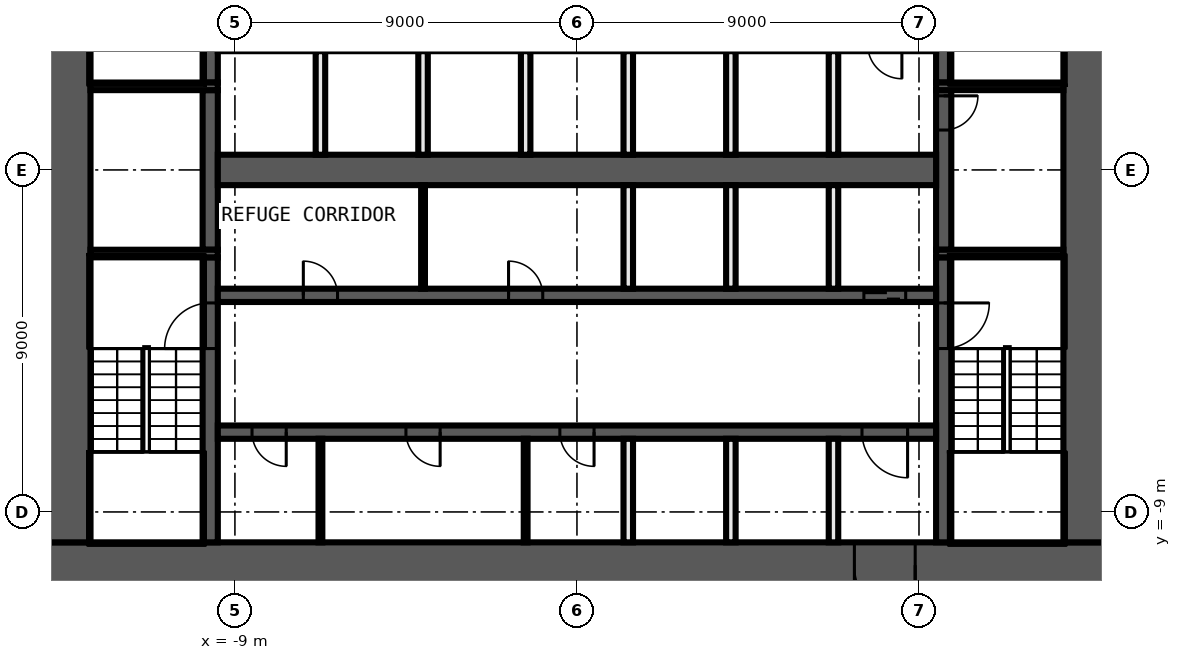
"""IFC4 building model, lengths in metres.
Left out: names, types, materials, properties, quantities, classifications, styles, units other than length and angle.
Written with IfcOpenShell. Run it as: python <this file> out.ifc"""

import sys

from ifc_helpers import new_model, si_unit, direction, frame, frame_2d, origin, place, context, subcontext, project, spatial, rectangle, extrude, element, fill, save


model = new_model("IFC4")
c1 = context("Model", 3, precision=1e-05, world=origin(), true_north=direction((0.0, 1.0)))
c2 = subcontext(c1, "Body", "Model", "MODEL_VIEW")
j1 = project(units=[si_unit("LENGTHUNIT", "METRE"), si_unit("PLANEANGLEUNIT", "RADIAN")], contexts=[c1])
p1 = place(None, origin())
s1 = spatial("IfcSite", under=j1, at=p1, CompositionType="ELEMENT")
p2 = place(p1, origin())
s2 = spatial("IfcBuilding", under=s1, at=p2, CompositionType="ELEMENT")
p3 = place(p2, frame((0.0, 0.0, 89.2)))
s3 = spatial("IfcBuildingStorey", under=s2, at=p3, CompositionType="ELEMENT", Elevation=89.2)
p4 = place(p3, frame((14.0, -10.4, 0.0), z_axis=(0.0, 0.0, 1.0), x_axis=(-1.0, 0.0, 0.0)))
e1 = element("IfcWall", 1, at=p4, inside=s3, PredefinedType="SHEAR", context=c2, shape_type="SweptSolid", body=[
    extrude(rectangle(XDim=28.0, YDim=1.2, at=frame_2d((14.0, 0.0))), origin(), (0.0, 0.0, 1.0), 5.55),
])
p5 = place(p4, frame((5.1, 0.0, 0.0)))
e2 = element("IfcOpeningElement", 2, at=p5, cuts=e1, PredefinedType="OPENING", context=c2, shape_type="SweptSolid", body=[
    extrude(rectangle(XDim=1.6, YDim=2.1, at=frame_2d((0.8, 1.05))), frame((0.0, 0.61, 0.0), z_axis=(0.0, -1.0, 0.0), x_axis=(1.0, 0.0, 0.0)), (0.0, 0.0, 1.0), 1.22),
])
for number, where, z_axis, x_axis in (
    (3, (13.4, 9.8, 0.0), (0.0, 0.0, 1.0), (0.0, -1.0, 0.0)),
    (4, (-13.4, -9.8, 0.0), (0.0, 0.0, 1.0), (0.0, 1.0, 0.0)),
):
    element("IfcWall", number, at=place(p3, frame(where, z_axis=z_axis, x_axis=x_axis)), inside=s3, PredefinedType="SHEAR", context=c2, shape_type="SweptSolid", body=[
        extrude(rectangle(XDim=19.6, YDim=1.2, at=frame_2d((9.8, 0.0))), origin(), (0.0, 0.0, 1.0), 5.55),
    ])
p6 = place(p3, frame((9.65, -2.3, 0.0), z_axis=(0.0, 0.0, 1.0), x_axis=(0.0, -1.0, 0.0)))
e5 = element("IfcWall", 5, at=p6, inside=s3, PredefinedType="SHEAR", context=c2, shape_type="SweptSolid", body=[
    extrude(rectangle(XDim=7.5, YDim=0.4, at=frame_2d((3.75, 0.0))), origin(), (0.0, 0.0, 1.0), 5.55),
])
p7 = place(p6, frame((1.2, 0.0, 0.0)))
e6 = element("IfcOpeningElement", 6, at=p7, cuts=e5, PredefinedType="OPENING", context=c2, shape_type="SweptSolid", body=[
    extrude(rectangle(XDim=1.2, YDim=2.1, at=frame_2d((0.6, 1.05))), frame((0.0, 0.21, 0.0), z_axis=(0.0, -1.0, 0.0), x_axis=(1.0, 0.0, 0.0)), (0.0, 0.0, 1.0), 0.42),
])
p8 = place(p3, frame((9.65, 2.1, 0.0), z_axis=(0.0, 0.0, 1.0), x_axis=(0.0, -1.0, 0.0)))
e7 = element("IfcWall", 7, at=p8, inside=s3, PredefinedType="SHEAR", context=c2, shape_type="SweptSolid", body=[
    extrude(rectangle(XDim=4.2, YDim=0.4, at=frame_2d((2.1, 0.0))), origin(), (0.0, 0.0, 1.0), 5.55),
])
p9 = place(p8, frame((0.15, 0.0, 0.0)))
e8 = element("IfcOpeningElement", 8, at=p9, cuts=e7, PredefinedType="OPENING", context=c2, shape_type="SweptSolid", body=[
    extrude(rectangle(XDim=0.9, YDim=2.1, at=frame_2d((0.45, 1.05))), frame((0.0, 0.21, 0.0), z_axis=(0.0, -1.0, 0.0), x_axis=(1.0, 0.0, 0.0)), (0.0, 0.0, 1.0), 0.42),
])
p10 = place(p3, frame((9.65, 9.8, 0.0), z_axis=(0.0, 0.0, 1.0), x_axis=(0.0, -1.0, 0.0)))
e9 = element("IfcWall", 9, at=p10, inside=s3, PredefinedType="SHEAR", context=c2, shape_type="SweptSolid", body=[
    extrude(rectangle(XDim=7.5, YDim=0.4, at=frame_2d((3.75, 0.0))), origin(), (0.0, 0.0, 1.0), 5.55),
])
p11 = place(p10, frame((5.1, 0.0, 0.0)))
e10 = element("IfcOpeningElement", 10, at=p11, cuts=e9, PredefinedType="OPENING", context=c2, shape_type="SweptSolid", body=[
    extrude(rectangle(XDim=1.2, YDim=2.1, at=frame_2d((0.6, 1.05))), frame((0.0, 0.21, 0.0), z_axis=(0.0, -1.0, 0.0), x_axis=(1.0, 0.0, 0.0)), (0.0, 0.0, 1.0), 0.42),
])
p12 = place(p3, frame((-9.65, -9.8, 0.0), z_axis=(0.0, 0.0, 1.0), x_axis=(0.0, 1.0, 0.0)))
e11 = element("IfcWall", 11, at=p12, inside=s3, PredefinedType="SHEAR", context=c2, shape_type="SweptSolid", body=[
    extrude(rectangle(XDim=7.5, YDim=0.4, at=frame_2d((3.75, 0.0))), origin(), (0.0, 0.0, 1.0), 5.55),
])
p13 = place(p12, frame((5.1, 0.0, 0.0)))
e12 = element("IfcOpeningElement", 12, at=p13, cuts=e11, PredefinedType="OPENING", context=c2, shape_type="SweptSolid", body=[
    extrude(rectangle(XDim=1.2, YDim=2.1, at=frame_2d((0.6, 1.05))), frame((0.0, 0.21, 0.0), z_axis=(0.0, -1.0, 0.0), x_axis=(1.0, 0.0, 0.0)), (0.0, 0.0, 1.0), 0.42),
])
p14 = place(p3, frame((-9.65, -2.1, 0.0), z_axis=(0.0, 0.0, 1.0), x_axis=(0.0, 1.0, 0.0)))
e13 = element("IfcWall", 13, at=p14, inside=s3, PredefinedType="SHEAR", context=c2, shape_type="SweptSolid", body=[
    extrude(rectangle(XDim=4.2, YDim=0.4, at=frame_2d((2.1, 0.0))), origin(), (0.0, 0.0, 1.0), 5.55),
])
p15 = place(p3, frame((-9.65, 2.3, 0.0), z_axis=(0.0, 0.0, 1.0), x_axis=(0.0, 1.0, 0.0)))
e14 = element("IfcWall", 14, at=p15, inside=s3, PredefinedType="SHEAR", context=c2, shape_type="SweptSolid", body=[
    extrude(rectangle(XDim=7.5, YDim=0.4, at=frame_2d((3.75, 0.0))), origin(), (0.0, 0.0, 1.0), 5.55),
])
p16 = place(p15, frame((1.2, 0.0, 0.0)))
e15 = element("IfcOpeningElement", 15, at=p16, cuts=e14, PredefinedType="OPENING", context=c2, shape_type="SweptSolid", body=[
    extrude(rectangle(XDim=1.2, YDim=2.1, at=frame_2d((0.6, 1.05))), frame((0.0, 0.21, 0.0), z_axis=(0.0, -1.0, 0.0), x_axis=(1.0, 0.0, 0.0)), (0.0, 0.0, 1.0), 0.42),
])
for number, where, z_axis, x_axis in (
    (16, (9.45, 2.2, 0.0), (0.0, 0.0, 1.0), (1.0, 0.0, 0.0)),
    (17, (-9.45, 2.2, 0.0), (0.0, 0.0, 1.0), (-1.0, 0.0, 0.0)),
    (18, (9.45, -2.2, 0.0), (0.0, 0.0, 1.0), (1.0, 0.0, 0.0)),
    (19, (-9.45, -2.2, 0.0), (0.0, 0.0, 1.0), (-1.0, 0.0, 0.0)),
):
    element("IfcWall", number, at=place(p3, frame(where, z_axis=z_axis, x_axis=x_axis)), inside=s3, PredefinedType="SHEAR", context=c2, shape_type="SweptSolid", body=[
        extrude(rectangle(XDim=3.35, YDim=0.2, at=frame_2d((1.675, 0.0))), origin(), (0.0, 0.0, 1.0), 5.55),
    ])
p17 = place(p3, frame((-9.45, -3.3, 0.0), z_axis=(0.0, 0.0, 1.0), x_axis=(1.0, 0.0, 0.0)))
e20 = element("IfcWall", 20, at=p17, inside=s3, PredefinedType="SHEAR", context=c2, shape_type="SweptSolid", body=[
    extrude(rectangle(XDim=18.9, YDim=0.35, at=frame_2d((9.45, 0.0))), origin(), (0.0, 0.0, 1.0), 5.55),
])
p18 = place(p17, frame((17.0, 0.0, 0.0)))
e21 = element("IfcOpeningElement", 21, at=p18, cuts=e20, PredefinedType="OPENING", context=c2, shape_type="SweptSolid", body=[
    extrude(rectangle(XDim=1.1, YDim=2.1, at=frame_2d((0.55, 1.05))), frame((0.0, 0.185, 0.0), z_axis=(0.0, -1.0, 0.0), x_axis=(1.0, 0.0, 0.0)), (0.0, 0.0, 1.0), 0.37),
])
p19 = place(p17, frame((2.25, 0.0, 0.0)))
e22 = element("IfcOpeningElement", 22, at=p19, cuts=e20, PredefinedType="OPENING", context=c2, shape_type="SweptSolid", body=[
    extrude(rectangle(XDim=0.9, YDim=2.1, at=frame_2d((0.45, 1.05))), frame((0.0, 0.185, 0.0), z_axis=(0.0, -1.0, 0.0), x_axis=(1.0, 0.0, 0.0)), (0.0, 0.0, 1.0), 0.37),
])
p20 = place(p17, frame((7.65, 0.0, 0.0)))
e23 = element("IfcOpeningElement", 23, at=p20, cuts=e20, PredefinedType="OPENING", context=c2, shape_type="SweptSolid", body=[
    extrude(rectangle(XDim=0.9, YDim=2.1, at=frame_2d((0.45, 1.05))), frame((0.0, 0.185, 0.0), z_axis=(0.0, -1.0, 0.0), x_axis=(1.0, 0.0, 0.0)), (0.0, 0.0, 1.0), 0.37),
])
p21 = place(p3, frame((9.45, -6.9, 0.0), z_axis=(0.0, 0.0, 1.0), x_axis=(-1.0, 0.0, 0.0)))
e24 = element("IfcWall", 24, at=p21, inside=s3, PredefinedType="SHEAR", context=c2, shape_type="SweptSolid", body=[
    extrude(rectangle(XDim=18.9, YDim=0.35, at=frame_2d((9.45, 0.0))), origin(), (0.0, 0.0, 1.0), 5.55),
])
p22 = place(p21, frame((0.75, 0.0, 0.0)))
e25 = element("IfcOpeningElement", 25, at=p22, cuts=e24, PredefinedType="OPENING", context=c2, shape_type="SweptSolid", body=[
    extrude(rectangle(XDim=1.2, YDim=2.1, at=frame_2d((0.6, 1.05))), frame((0.0, 0.185, 0.0), z_axis=(0.0, -1.0, 0.0), x_axis=(1.0, 0.0, 0.0)), (0.0, 0.0, 1.0), 0.37),
])
p23 = place(p21, frame((17.1, 0.0, 0.0)))
e26 = element("IfcOpeningElement", 26, at=p23, cuts=e24, PredefinedType="OPENING", context=c2, shape_type="SweptSolid", body=[
    extrude(rectangle(XDim=0.9, YDim=2.1, at=frame_2d((0.45, 1.05))), frame((0.0, 0.185, 0.0), z_axis=(0.0, -1.0, 0.0), x_axis=(1.0, 0.0, 0.0)), (0.0, 0.0, 1.0), 0.37),
])
p24 = place(p21, frame((13.05, 0.0, 0.0)))
e27 = element("IfcOpeningElement", 27, at=p24, cuts=e24, PredefinedType="OPENING", context=c2, shape_type="SweptSolid", body=[
    extrude(rectangle(XDim=0.9, YDim=2.1, at=frame_2d((0.45, 1.05))), frame((0.0, 0.185, 0.0), z_axis=(0.0, -1.0, 0.0), x_axis=(1.0, 0.0, 0.0)), (0.0, 0.0, 1.0), 0.37),
])
p25 = place(p21, frame((9.0, 0.0, 0.0)))
e28 = element("IfcOpeningElement", 28, at=p25, cuts=e24, PredefinedType="OPENING", context=c2, shape_type="SweptSolid", body=[
    extrude(rectangle(XDim=0.9, YDim=2.1, at=frame_2d((0.45, 1.05))), frame((0.0, 0.185, 0.0), z_axis=(0.0, -1.0, 0.0), x_axis=(1.0, 0.0, 0.0)), (0.0, 0.0, 1.0), 0.37),
])
p26 = place(p3, frame((-9.45, 0.0, 0.0), z_axis=(0.0, 0.0, 1.0), x_axis=(1.0, 0.0, 0.0)))
e29 = element("IfcWall", 29, at=p26, inside=s3, PredefinedType="SHEAR", context=c2, shape_type="SweptSolid", body=[
    extrude(rectangle(XDim=18.9, YDim=0.8, at=frame_2d((9.45, 0.0))), origin(), (0.0, 0.0, 1.0), 5.55),
])
for number, where, z_axis, x_axis in (
    (30, (6.75, -9.8, 0.0), (0.0, 0.0, 1.0), (0.0, 1.0, 0.0)),
    (31, (6.75, -3.125, 0.0), (0.0, 0.0, 1.0), (0.0, 1.0, 0.0)),
    (32, (6.75, 0.4, 0.0), (0.0, 0.0, 1.0), (0.0, 1.0, 0.0)),
    (33, (4.05, -9.8, 0.0), (0.0, 0.0, 1.0), (0.0, 1.0, 0.0)),
    (34, (4.05, -3.125, 0.0), (0.0, 0.0, 1.0), (0.0, 1.0, 0.0)),
    (35, (4.05, 0.4, 0.0), (0.0, 0.0, 1.0), (0.0, 1.0, 0.0)),
    (36, (1.35, -9.8, 0.0), (0.0, 0.0, 1.0), (0.0, 1.0, 0.0)),
    (37, (1.35, -3.125, 0.0), (0.0, 0.0, 1.0), (0.0, 1.0, 0.0)),
    (38, (1.35, 0.4, 0.0), (0.0, 0.0, 1.0), (0.0, 1.0, 0.0)),
):
    element("IfcWall", number, at=place(p3, frame(where, z_axis=z_axis, x_axis=x_axis)), inside=s3, PredefinedType="SOLIDWALL", context=c2, shape_type="SweptSolid", body=[
        extrude(rectangle(XDim=2.725, YDim=0.25, at=frame_2d((1.363, 0.0))), origin(), (0.0, 0.0, 1.0), 5.55),
    ])
p27 = place(p3, frame((-1.35, -9.8, 0.0), z_axis=(0.0, 0.0, 1.0), x_axis=(0.0, 1.0, 0.0)))
e39 = element("IfcWall", 39, at=p27, inside=s3, PredefinedType="PARTITIONING", context=c2, shape_type="SweptSolid", body=[
    extrude(rectangle(XDim=2.725, YDim=0.1, at=frame_2d((1.363, 0.0))), origin(), (0.0, 0.0, 1.0), 5.55),
])
p28 = place(p3, frame((-1.35, 0.4, 0.0), z_axis=(0.0, 0.0, 1.0), x_axis=(0.0, 1.0, 0.0)))
e40 = element("IfcWall", 40, at=p28, inside=s3, PredefinedType="SOLIDWALL", context=c2, shape_type="SweptSolid", body=[
    extrude(rectangle(XDim=2.725, YDim=0.25, at=frame_2d((1.363, 0.0))), origin(), (0.0, 0.0, 1.0), 5.55),
])
p29 = place(p3, frame((-4.05, -3.125, 0.0), z_axis=(0.0, 0.0, 1.0), x_axis=(0.0, 1.0, 0.0)))
e41 = element("IfcWall", 41, at=p29, inside=s3, PredefinedType="PARTITIONING", context=c2, shape_type="SweptSolid", body=[
    extrude(rectangle(XDim=2.725, YDim=0.1, at=frame_2d((1.363, 0.0))), origin(), (0.0, 0.0, 1.0), 5.55),
])
p30 = place(p3, frame((-4.05, 0.4, 0.0), z_axis=(0.0, 0.0, 1.0), x_axis=(0.0, 1.0, 0.0)))
e42 = element("IfcWall", 42, at=p30, inside=s3, PredefinedType="SOLIDWALL", context=c2, shape_type="SweptSolid", body=[
    extrude(rectangle(XDim=2.725, YDim=0.25, at=frame_2d((1.363, 0.0))), origin(), (0.0, 0.0, 1.0), 5.55),
])
p31 = place(p3, frame((-6.75, -9.8, 0.0), z_axis=(0.0, 0.0, 1.0), x_axis=(0.0, 1.0, 0.0)))
e43 = element("IfcWall", 43, at=p31, inside=s3, PredefinedType="PARTITIONING", context=c2, shape_type="SweptSolid", body=[
    extrude(rectangle(XDim=2.725, YDim=0.1, at=frame_2d((1.363, 0.0))), origin(), (0.0, 0.0, 1.0), 5.55),
])
p32 = place(p3, frame((-6.75, 0.4, 0.0), z_axis=(0.0, 0.0, 1.0), x_axis=(0.0, 1.0, 0.0)))
e44 = element("IfcWall", 44, at=p32, inside=s3, PredefinedType="SOLIDWALL", context=c2, shape_type="SweptSolid", body=[
    extrude(rectangle(XDim=2.725, YDim=0.25, at=frame_2d((1.363, 0.0))), origin(), (0.0, 0.0, 1.0), 5.55),
])
p33 = place(p9, origin())
e45 = element("IfcDoor", 45, at=p33, inside=s3, OperationType="SINGLE_SWING_RIGHT", PredefinedType="DOOR", context=c2, shape_type="SweptSolid", body=[
    extrude(rectangle(XDim=0.9, YDim=2.1, at=frame_2d((0.45, 1.05))), frame((0.0, 0.025, 0.0), z_axis=(0.0, -1.0, 0.0), x_axis=(1.0, 0.0, 0.0)), (0.0, 0.0, 1.0), 0.05),
])
fill(e8, e45)
p34 = place(p18, origin())
e46 = element("IfcDoor", 46, at=p34, inside=s3, OperationType="DOUBLE_DOOR_SLIDING", PredefinedType="DOOR", context=c2, shape_type="SweptSolid", body=[
    extrude(rectangle(XDim=1.1, YDim=2.1, at=frame_2d((0.55, 1.05))), frame((0.0, 0.025, 0.0), z_axis=(0.0, -1.0, 0.0), x_axis=(1.0, 0.0, 0.0)), (0.0, 0.0, 1.0), 0.05),
])
fill(e21, e46)
p35 = place(p5, origin())
e47 = element("IfcDoor", 47, at=p35, inside=s3, OperationType="DOUBLE_DOOR_SINGLE_SWING", PredefinedType="DOOR", context=c2, shape_type="SweptSolid", body=[
    extrude(rectangle(XDim=1.6, YDim=2.1, at=frame_2d((0.8, 1.05))), frame((0.0, 0.025, 0.0), z_axis=(0.0, -1.0, 0.0), x_axis=(1.0, 0.0, 0.0)), (0.0, 0.0, 1.0), 0.05),
])
fill(e2, e47)
p36 = place(p22, origin())
e48 = element("IfcDoor", 48, at=p36, inside=s3, OperationType="SINGLE_SWING_LEFT", PredefinedType="DOOR", context=c2, shape_type="SweptSolid", body=[
    extrude(rectangle(XDim=1.2, YDim=2.1, at=frame_2d((0.6, 1.05))), frame((0.0, 0.025, 0.0), z_axis=(0.0, -1.0, 0.0), x_axis=(1.0, 0.0, 0.0)), (0.0, 0.0, 1.0), 0.05),
])
fill(e25, e48)
p37 = place(p19, origin())
e49 = element("IfcDoor", 49, at=p37, inside=s3, OperationType="SINGLE_SWING_RIGHT", PredefinedType="DOOR", context=c2, shape_type="SweptSolid", body=[
    extrude(rectangle(XDim=0.9, YDim=2.1, at=frame_2d((0.45, 1.05))), frame((0.0, 0.025, 0.0), z_axis=(0.0, -1.0, 0.0), x_axis=(1.0, 0.0, 0.0)), (0.0, 0.0, 1.0), 0.05),
])
fill(e22, e49)
p38 = place(p20, origin())
e50 = element("IfcDoor", 50, at=p38, inside=s3, OperationType="SINGLE_SWING_LEFT", PredefinedType="DOOR", context=c2, shape_type="SweptSolid", body=[
    extrude(rectangle(XDim=0.9, YDim=2.1, at=frame_2d((0.45, 1.05))), frame((0.0, 0.025, 0.0), z_axis=(0.0, -1.0, 0.0), x_axis=(1.0, 0.0, 0.0)), (0.0, 0.0, 1.0), 0.05),
])
fill(e23, e50)
p39 = place(p23, origin())
e51 = element("IfcDoor", 51, at=p39, inside=s3, OperationType="SINGLE_SWING_RIGHT", PredefinedType="DOOR", context=c2, shape_type="SweptSolid", body=[
    extrude(rectangle(XDim=0.9, YDim=2.1, at=frame_2d((0.45, 1.05))), frame((0.0, 0.025, 0.0), z_axis=(0.0, -1.0, 0.0), x_axis=(1.0, 0.0, 0.0)), (0.0, 0.0, 1.0), 0.05),
])
fill(e26, e51)
p40 = place(p24, origin())
e52 = element("IfcDoor", 52, at=p40, inside=s3, OperationType="SINGLE_SWING_LEFT", PredefinedType="DOOR", context=c2, shape_type="SweptSolid", body=[
    extrude(rectangle(XDim=0.9, YDim=2.1, at=frame_2d((0.45, 1.05))), frame((0.0, 0.025, 0.0), z_axis=(0.0, -1.0, 0.0), x_axis=(1.0, 0.0, 0.0)), (0.0, 0.0, 1.0), 0.05),
])
fill(e27, e52)
p41 = place(p25, origin())
e53 = element("IfcDoor", 53, at=p41, inside=s3, OperationType="SINGLE_SWING_RIGHT", PredefinedType="DOOR", context=c2, shape_type="SweptSolid", body=[
    extrude(rectangle(XDim=0.9, YDim=2.1, at=frame_2d((0.45, 1.05))), frame((0.0, 0.025, 0.0), z_axis=(0.0, -1.0, 0.0), x_axis=(1.0, 0.0, 0.0)), (0.0, 0.0, 1.0), 0.05),
])
fill(e28, e53)
p42 = place(p7, origin())
e54 = element("IfcDoor", 54, at=p42, inside=s3, OperationType="SINGLE_SWING_RIGHT", PredefinedType="DOOR", context=c2, shape_type="SweptSolid", body=[
    extrude(rectangle(XDim=1.2, YDim=2.1, at=frame_2d((0.6, 1.05))), frame((0.0, 0.025, 0.0), z_axis=(0.0, -1.0, 0.0), x_axis=(1.0, 0.0, 0.0)), (0.0, 0.0, 1.0), 0.05),
])
fill(e6, e54)
p43 = place(p13, origin())
e55 = element("IfcDoor", 55, at=p43, inside=s3, OperationType="SINGLE_SWING_LEFT", PredefinedType="DOOR", context=c2, shape_type="SweptSolid", body=[
    extrude(rectangle(XDim=1.2, YDim=2.1, at=frame_2d((0.6, 1.05))), frame((0.0, 0.025, 0.0), z_axis=(0.0, -1.0, 0.0), x_axis=(1.0, 0.0, 0.0)), (0.0, 0.0, 1.0), 0.05),
])
fill(e12, e55)
save(model, sys.argv[1])
